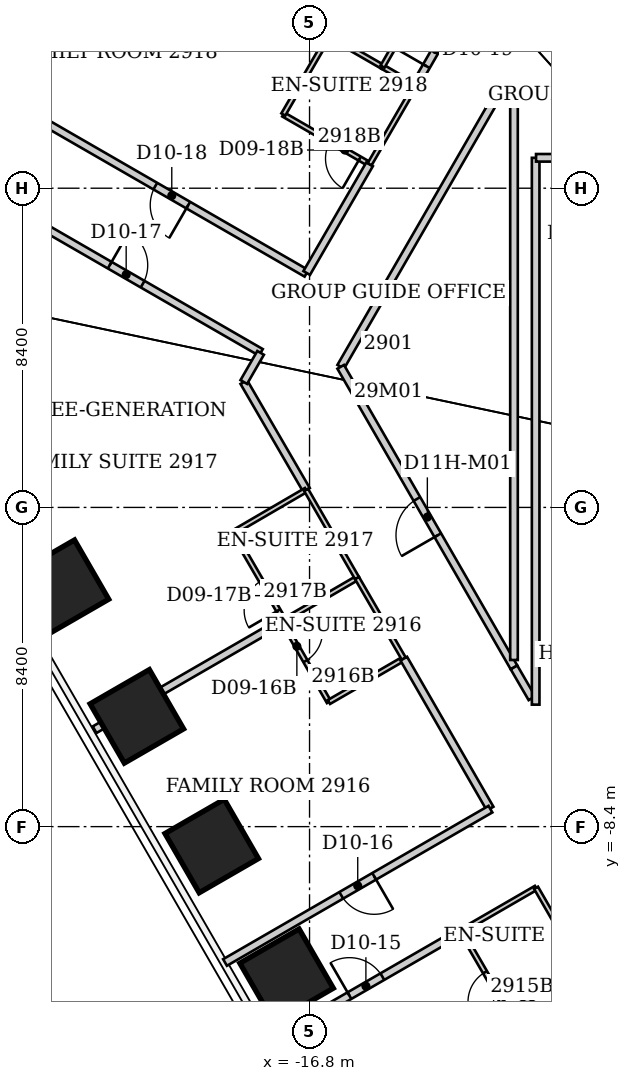
"""IFC4 building model, lengths in metres.
Left out: names, types, materials, properties, quantities, classifications, styles, units other than length and angle.
Written with IfcOpenShell. Run it as: python <this file> out.ifc"""

import sys

from ifc_helpers import new_model, si_unit, direction, frame, frame_2d, origin, origin_2d, place, context, subcontext, project, spatial, rectangle, extrude, element, fill, save


model = new_model("IFC4")
c1 = context("Model", 3, precision=1e-05, world=origin(), true_north=direction((0.0, 1.0)))
c2 = subcontext(c1, "Body", "Model", "MODEL_VIEW")
j1 = project(units=[si_unit("LENGTHUNIT", "METRE"), si_unit("PLANEANGLEUNIT", "RADIAN")], contexts=[c1])
p1 = place(None, origin())
s1 = spatial("IfcSite", under=j1, at=p1, CompositionType="ELEMENT")
p2 = place(p1, origin())
s2 = spatial("IfcBuilding", under=s1, at=p2, CompositionType="ELEMENT")
p3 = place(p2, frame((0.0, 0.0, 119.6)))
s3 = spatial("IfcBuildingStorey", under=s2, at=p3, CompositionType="ELEMENT", Elevation=119.6)
for number, where, z_axis, x_axis in (
    (1, (-17.404, -12.323, 0.0), (0.0, 0.0, 1.0), (-0.866, -0.5, 0.0)),
    (2, (-19.374, -8.911, 0.0), (0.0, 0.0, 1.0), (-0.866, -0.5, 0.0)),
    (3, (-21.344, -5.499, 0.0), (0.0, 0.0, 1.0), (-0.866, -0.5, 0.0)),
    (4, (-23.314, -2.087, 0.0), (0.0, 0.0, 1.0), (-0.866, -0.5, 0.0)),
):
    element("IfcColumn", number, at=place(p3, frame(where, z_axis=z_axis, x_axis=x_axis)), inside=s3, PredefinedType="COLUMN", context=c2, shape_type="SweptSolid", body=[
        extrude(rectangle(XDim=1.8, YDim=1.8, at=origin_2d()), origin(), (0.0, 0.0, 1.0), 3.8),
    ])
p4 = place(p3, frame((-25.17, 8.17, 0.0), z_axis=(0.0, 0.0, 1.0), x_axis=(0.866209421097, -0.499681137129, 0.0)))
e5 = element("IfcWall", 5, at=p4, inside=s3, PredefinedType="PARTITIONING", context=c2, shape_type="SweptSolid", body=[
    extrude(rectangle(XDim=8.185, YDim=0.2, at=frame_2d((4.092, 0.0))), origin(), (0.0, 0.0, 1.0), 3.64),
])
p5 = place(p4, frame((3.593, 0.0, 0.0)))
e6 = element("IfcOpeningElement", 6, at=p5, cuts=e5, PredefinedType="OPENING", context=c2, shape_type="SweptSolid", body=[
    extrude(rectangle(XDim=1.0, YDim=2.13, at=frame_2d((0.5, 1.065))), frame((0.0, 0.1, 0.0), z_axis=(0.0, -1.0, 0.0), x_axis=(1.0, 0.0, 0.0)), (0.0, 0.0, 1.0), 0.2),
])
p6 = place(p3, frame((-18.81, -0.66, 0.0), z_axis=(0.0, 0.0, 1.0), x_axis=(0.501789229896, -0.86498992408, 0.0)))
e7 = element("IfcWall", 7, at=p6, inside=s3, PredefinedType="PARTITIONING", context=c2, shape_type="SweptSolid", body=[
    extrude(rectangle(XDim=2.671, YDim=0.12, at=frame_2d((1.335, 0.0))), origin(), (0.0, 0.0, 1.0), 3.64),
])
p7 = place(p6, frame((1.47, 0.0, 0.0)))
e8 = element("IfcOpeningElement", 8, at=p7, cuts=e7, PredefinedType="OPENING", context=c2, shape_type="SweptSolid", body=[
    extrude(rectangle(XDim=0.9, YDim=2.03, at=frame_2d((0.45, 1.015))), frame((0.0, 0.06, 0.0), z_axis=(0.0, -1.0, 0.0), x_axis=(1.0, 0.0, 0.0)), (0.0, 0.0, 1.0), 0.12),
])
p8 = place(p3, frame((-18.53, 3.3, 0.0), z_axis=(0.0, 0.0, 1.0), x_axis=(0.502321995867, -0.864680641895, 0.0)))
e9 = element("IfcWall", 9, at=p8, inside=s3, PredefinedType="PARTITIONING", context=c2, shape_type="SweptSolid", body=[
    extrude(rectangle(XDim=3.285, YDim=0.2, at=frame_2d((1.642, 0.0))), origin(), (0.0, 0.0, 1.0), 3.64),
])
p9 = place(p3, frame((-18.087, 4.067, 0.0), z_axis=(0.0, 0.0, 1.0), x_axis=(-0.499905448813, -0.866079986056, 0.0)))
e10 = element("IfcWall", 10, at=p9, inside=s3, PredefinedType="PARTITIONING", context=c2, shape_type="SweptSolid", body=[
    extrude(rectangle(XDim=0.885, YDim=0.2, at=frame_2d((0.443, 0.0))), origin(), (0.0, 0.0, 1.0), 3.64),
])
p10 = place(p3, frame((-17.824, -14.045, 0.0), z_axis=(0.0, 0.0, 1.0), x_axis=(0.866007919525, 0.500030282404, 0.0)))
e11 = element("IfcWall", 11, at=p10, inside=s3, PredefinedType="PARTITIONING", context=c2, shape_type="SweptSolid", body=[
    extrude(rectangle(XDim=5.79, YDim=0.2, at=frame_2d((2.895, 0.0))), origin(), (0.0, 0.0, 1.0), 3.64),
])
p11 = place(p10, frame((2.395, 0.0, 0.0)))
e12 = element("IfcOpeningElement", 12, at=p11, cuts=e11, PredefinedType="OPENING", context=c2, shape_type="SweptSolid", body=[
    extrude(rectangle(XDim=1.0, YDim=2.13, at=frame_2d((0.5, 1.065))), frame((0.0, 0.1, 0.0), z_axis=(0.0, -1.0, 0.0), x_axis=(1.0, 0.0, 0.0)), (0.0, 0.0, 1.0), 0.2),
])
p12 = place(p3, frame((-17.51, -3.0, 0.0), z_axis=(0.0, 0.0, 1.0), x_axis=(0.864434275542, 0.502745843611, 0.0)))
e13 = element("IfcWall", 13, at=p12, inside=s3, PredefinedType="PARTITIONING", context=c2, shape_type="SweptSolid", body=[
    extrude(rectangle(XDim=2.267, YDim=0.12, at=frame_2d((1.134, 0.0))), origin(), (0.0, 0.0, 1.0), 3.64),
])
p13 = place(p3, frame((-17.508, -3.004, 0.0), z_axis=(0.0, 0.0, 1.0), x_axis=(0.498775507858, -0.866731211369, 0.0)))
e14 = element("IfcWall", 14, at=p13, inside=s3, PredefinedType="PARTITIONING", context=c2, shape_type="SweptSolid", body=[
    extrude(rectangle(XDim=2.441, YDim=0.12, at=frame_2d((1.22, 0.0))), origin(), (0.0, 0.0, 1.0), 3.64),
])
p14 = place(p13, frame((0.3, 0.0, 0.0)))
e15 = element("IfcOpeningElement", 15, at=p14, cuts=e14, PredefinedType="OPENING", context=c2, shape_type="SweptSolid", body=[
    extrude(rectangle(XDim=0.9, YDim=2.03, at=frame_2d((0.45, 1.015))), frame((0.0, 0.06, 0.0), z_axis=(0.0, -1.0, 0.0), x_axis=(1.0, 0.0, 0.0)), (0.0, 0.0, 1.0), 0.12),
])
p15 = place(p3, frame((-17.49, 10.34, 0.0), z_axis=(0.0, 0.0, 1.0), x_axis=(0.866114241029, -0.499846097802, 0.0)))
e16 = element("IfcWall", 16, at=p15, inside=s3, PredefinedType="PARTITIONING", context=c2, shape_type="SweptSolid", body=[
    extrude(rectangle(XDim=2.621, YDim=0.12, at=frame_2d((1.311, 0.0))), origin(), (0.0, 0.0, 1.0), 3.64),
])
p16 = place(p15, frame((1.421, 0.0, 0.0)))
e17 = element("IfcOpeningElement", 17, at=p16, cuts=e16, PredefinedType="OPENING", context=c2, shape_type="SweptSolid", body=[
    extrude(rectangle(XDim=0.9, YDim=2.03, at=frame_2d((0.45, 1.015))), frame((0.0, 0.06, 0.0), z_axis=(0.0, -1.0, 0.0), x_axis=(1.0, 0.0, 0.0)), (0.0, 0.0, 1.0), 0.12),
])
p17 = place(p3, frame((-17.47, -2.97, 0.0), z_axis=(0.0, 0.0, 1.0), x_axis=(-0.865919350456, -0.50018364478, 0.0)))
e18 = element("IfcWall", 18, at=p17, inside=s3, PredefinedType="PARTITIONING", context=c2, shape_type="SweptSolid", body=[
    extrude(rectangle(XDim=5.758, YDim=0.2, at=frame_2d((2.879, 0.0))), origin(), (0.0, 0.0, 1.0), 3.64),
])
p18 = place(p3, frame((-16.89, 0.46, 0.0), z_axis=(0.0, 0.0, 1.0), x_axis=(-0.863822716314, -0.503795905878, 0.0)))
e19 = element("IfcWall", 19, at=p18, inside=s3, PredefinedType="PARTITIONING", context=c2, shape_type="SweptSolid", body=[
    extrude(rectangle(XDim=2.223, YDim=0.12, at=frame_2d((1.111, 0.0))), origin(), (0.0, 0.0, 1.0), 3.64),
])
p19 = place(p3, frame((-16.88, 6.16, 0.0), z_axis=(0.0, 0.0, 1.0), x_axis=(-0.866203958324, 0.499690606859, 0.0)))
e20 = element("IfcWall", 20, at=p19, inside=s3, PredefinedType="PARTITIONING", context=c2, shape_type="SweptSolid", body=[
    extrude(rectangle(XDim=8.185, YDim=0.2, at=frame_2d((4.093, 0.0))), origin(), (0.0, 0.0, 1.0), 3.64),
])
p20 = place(p19, frame((3.593, 0.0, 0.0)))
e21 = element("IfcOpeningElement", 21, at=p20, cuts=e20, PredefinedType="OPENING", context=c2, shape_type="SweptSolid", body=[
    extrude(rectangle(XDim=1.0, YDim=2.13, at=frame_2d((0.5, 1.065))), frame((0.0, 0.1, 0.0), z_axis=(0.0, -1.0, 0.0), x_axis=(1.0, 0.0, 0.0)), (0.0, 0.0, 1.0), 0.2),
])
p21 = place(p3, frame((-16.875, 6.169, 0.0), z_axis=(0.0, 0.0, 1.0), x_axis=(0.500689767595, 0.865626799854, 0.0)))
e22 = element("IfcWall", 22, at=p21, inside=s3, PredefinedType="PARTITIONING", context=c2, shape_type="SweptSolid", body=[
    extrude(rectangle(XDim=3.305, YDim=0.2, at=frame_2d((1.653, 0.0))), origin(), (0.0, 0.0, 1.0), 3.64),
])
p22 = place(p3, frame((-16.29, -5.12, 0.0), z_axis=(0.0, 0.0, 1.0), x_axis=(0.865497265561, 0.500913648553, 0.0)))
e23 = element("IfcWall", 23, at=p22, inside=s3, PredefinedType="PARTITIONING", context=c2, shape_type="SweptSolid", body=[
    extrude(rectangle(XDim=2.276, YDim=0.12, at=frame_2d((1.138, 0.0))), origin(), (0.0, 0.0, 1.0), 3.64),
])
p23 = place(p3, frame((-16.29, 12.41, 0.0), z_axis=(0.0, 0.0, 1.0), x_axis=(-0.501547039172, -0.865130376012, 0.0)))
e24 = element("IfcWall", 24, at=p23, inside=s3, PredefinedType="PARTITIONING", context=c2, shape_type="SweptSolid", body=[
    extrude(rectangle(XDim=2.393, YDim=0.12, at=frame_2d((1.196, 0.0))), origin(), (0.0, 0.0, 1.0), 3.64),
])
p24 = place(p3, frame((-16.29, 12.41, 0.0), z_axis=(0.0, 0.0, 1.0), x_axis=(0.866138091645, -0.499804768086, 0.0)))
e25 = element("IfcWall", 25, at=p24, inside=s3, PredefinedType="PARTITIONING", context=c2, shape_type="SweptSolid", body=[
    extrude(rectangle(XDim=1.626, YDim=0.12, at=frame_2d((0.813, 0.0))), origin(), (0.0, 0.0, 1.0), 3.64),
])
p25 = place(p3, frame((-15.98, 3.7, 0.0), z_axis=(0.0, 0.0, 1.0), x_axis=(0.500093981358, 0.865971136822, 0.0)))
e26 = element("IfcWall", 26, at=p25, inside=s3, PredefinedType="PARTITIONING", context=c2, shape_type="SweptSolid", body=[
    extrude(rectangle(XDim=8.418, YDim=0.2, at=frame_2d((4.209, 0.0))), origin(), (0.0, 0.0, 1.0), 3.64),
])
p26 = place(p3, frame((-15.55, -1.86, 0.0), z_axis=(0.0, 0.0, 1.0), x_axis=(-0.500098439427, 0.865968562295, 0.0)))
e27 = element("IfcWall", 27, at=p26, inside=s3, PredefinedType="PARTITIONING", context=c2, shape_type="SweptSolid", body=[
    extrude(rectangle(XDim=2.679, YDim=0.12, at=frame_2d((1.34, 0.0))), origin(), (0.0, 0.0, 1.0), 3.64),
])
p27 = place(p3, frame((-15.55, -1.86, 0.0), z_axis=(0.0, 0.0, 1.0), x_axis=(0.501856726365, -0.86495076519, 0.0)))
e28 = element("IfcWall", 28, at=p27, inside=s3, PredefinedType="PARTITIONING", context=c2, shape_type="SweptSolid", body=[
    extrude(rectangle(XDim=2.451, YDim=0.12, at=frame_2d((1.226, 0.0))), origin(), (0.0, 0.0, 1.0), 3.64),
])
p28 = place(p3, frame((-15.22, 9.03, 0.0), z_axis=(0.0, 0.0, 1.0), x_axis=(0.501502765098, 0.865156041763, 0.0)))
e29 = element("IfcWall", 29, at=p28, inside=s3, PredefinedType="PARTITIONING", context=c2, shape_type="SweptSolid", body=[
    extrude(rectangle(XDim=2.393, YDim=0.12, at=frame_2d((1.196, 0.0))), origin(), (0.0, 0.0, 1.0), 3.64),
])
p29 = place(p3, frame((-14.882, 11.597, 0.0), z_axis=(0.0, 0.0, 1.0), x_axis=(0.866181499781, -0.499729536286, 0.0)))
e30 = element("IfcWall", 30, at=p29, inside=s3, PredefinedType="PARTITIONING", context=c2, shape_type="SweptSolid", body=[
    extrude(rectangle(XDim=0.995, YDim=0.12, at=frame_2d((0.497, 0.0))), origin(), (0.0, 0.0, 1.0), 3.64),
])
p30 = place(p3, frame((-14.88, 11.6, 0.0), z_axis=(0.0, 0.0, 1.0), x_axis=(0.497704656183, 0.867346571569, 0.0)))
e31 = element("IfcWall", 31, at=p30, inside=s3, PredefinedType="PARTITIONING", context=c2, shape_type="SweptSolid", body=[
    extrude(rectangle(XDim=2.652, YDim=0.12, at=frame_2d((1.326, 0.0))), origin(), (0.0, 0.0, 1.0), 3.64),
])
p31 = place(p3, frame((-14.32, -3.98, 0.0), z_axis=(0.0, 0.0, 1.0), x_axis=(0.49899372311, -0.866605599046, 0.0)))
e32 = element("IfcWall", 32, at=p31, inside=s3, PredefinedType="PARTITIONING", context=c2, shape_type="SweptSolid", body=[
    extrude(rectangle(XDim=4.555, YDim=0.2, at=frame_2d((2.277, 0.0))), origin(), (0.0, 0.0, 1.0), 3.64),
])
p32 = place(p3, frame((-14.02, 11.1, 0.0), z_axis=(0.0, 0.0, 1.0), x_axis=(0.499641723021, 0.866232156305, 0.0)))
e33 = element("IfcWall", 33, at=p32, inside=s3, PredefinedType="PARTITIONING", context=c2, shape_type="SweptSolid", body=[
    extrude(rectangle(XDim=2.182, YDim=0.2, at=frame_2d((1.091, 0.0))), origin(), (0.0, 0.0, 1.0), 3.64),
])
p33 = place(p32, frame((0.591, 0.0, 0.0)))
e34 = element("IfcOpeningElement", 34, at=p33, cuts=e33, PredefinedType="OPENING", context=c2, shape_type="SweptSolid", body=[
    extrude(rectangle(XDim=1.0, YDim=2.13, at=frame_2d((0.5, 1.065))), frame((0.0, 0.1, 0.0), z_axis=(0.0, -1.0, 0.0), x_axis=(1.0, 0.0, 0.0)), (0.0, 0.0, 1.0), 0.2),
])
p34 = place(p3, frame((-12.81, -11.15, 0.0), z_axis=(0.0, 0.0, 1.0), x_axis=(0.501813488763, -0.864975850817, 0.0)))
e35 = element("IfcWall", 35, at=p34, inside=s3, PredefinedType="PARTITIONING", context=c2, shape_type="SweptSolid", body=[
    extrude(rectangle(XDim=2.451, YDim=0.12, at=frame_2d((1.226, 0.0))), origin(), (0.0, 0.0, 1.0), 3.64),
])
p35 = place(p34, frame((1.251, 0.0, 0.0)))
e36 = element("IfcOpeningElement", 36, at=p35, cuts=e35, PredefinedType="OPENING", context=c2, shape_type="SweptSolid", body=[
    extrude(rectangle(XDim=0.9, YDim=2.03, at=frame_2d((0.45, 1.015))), frame((0.0, 0.06, 0.0), z_axis=(0.0, -1.0, 0.0), x_axis=(1.0, 0.0, 0.0)), (0.0, 0.0, 1.0), 0.12),
])
p36 = place(p3, frame((-12.81, -11.15, 0.0), z_axis=(0.0, 0.0, 1.0), x_axis=(0.865543766642, 0.500833293649, 0.0)))
e37 = element("IfcWall", 37, at=p36, inside=s3, PredefinedType="PARTITIONING", context=c2, shape_type="SweptSolid", body=[
    extrude(rectangle(XDim=2.276, YDim=0.12, at=frame_2d((1.138, 0.0))), origin(), (0.0, 0.0, 1.0), 3.64),
])
p37 = place(p3, frame((-12.04, -7.94, 0.0), z_axis=(0.0, 0.0, 1.0), x_axis=(-0.86587701925, -0.500256921525, 0.0)))
e38 = element("IfcWall", 38, at=p37, inside=s3, PredefinedType="PARTITIONING", context=c2, shape_type="SweptSolid", body=[
    extrude(rectangle(XDim=8.066, YDim=0.2, at=frame_2d((4.033, 0.0))), origin(), (0.0, 0.0, 1.0), 3.64),
])
p38 = place(p37, frame((3.533, 0.0, 0.0)))
e39 = element("IfcOpeningElement", 39, at=p38, cuts=e38, PredefinedType="OPENING", context=c2, shape_type="SweptSolid", body=[
    extrude(rectangle(XDim=1.0, YDim=2.13, at=frame_2d((0.5, 1.065))), frame((0.0, 0.1, 0.0), z_axis=(0.0, -1.0, 0.0), x_axis=(1.0, 0.0, 0.0)), (0.0, 0.0, 1.0), 0.2),
])
p39 = place(p3, frame((-11.77, 10.99, 0.0), z_axis=(0.0, 0.0, 1.0), x_axis=(1.0, 0.0, 0.0)))
e40 = element("IfcWall", 40, at=p39, inside=s3, PredefinedType="PARTITIONING", context=c2, shape_type="SweptSolid", body=[
    extrude(rectangle(XDim=0.35, YDim=0.2, at=frame_2d((0.175, 0.0))), origin(), (0.0, 0.0, 1.0), 3.64),
])
p40 = place(p3, frame((-11.58, -13.27, 0.0), z_axis=(0.0, 0.0, 1.0), x_axis=(0.867428373024, 0.497562074192, 0.0)))
e41 = element("IfcWall", 41, at=p40, inside=s3, PredefinedType="PARTITIONING", context=c2, shape_type="SweptSolid", body=[
    extrude(rectangle(XDim=2.271, YDim=0.12, at=frame_2d((1.136, 0.0))), origin(), (0.0, 0.0, 1.0), 3.64),
])
p41 = place(p3, frame((-11.42, -4.21, 0.0), z_axis=(0.0, 0.0, 1.0), x_axis=(-0.499446957289, 0.866344467781, 0.0)))
e42 = element("IfcWall", 42, at=p41, inside=s3, PredefinedType="PARTITIONING", context=c2, shape_type="SweptSolid", body=[
    extrude(rectangle(XDim=9.13, YDim=0.2, at=frame_2d((4.565, 0.0))), origin(), (0.0, 0.0, 1.0), 3.64),
])
p42 = place(p41, frame((4.015, 0.0, 0.0)))
e43 = element("IfcOpeningElement", 43, at=p42, cuts=e42, PredefinedType="OPENING", context=c2, shape_type="SweptSolid", body=[
    extrude(rectangle(XDim=1.1, YDim=2.2, at=frame_2d((0.55, 1.1))), frame((0.0, 0.1, 0.0), z_axis=(0.0, -1.0, 0.0), x_axis=(1.0, 0.0, 0.0)), (0.0, 0.0, 1.0), 0.2),
])
p43 = place(p3, frame((-11.42, 10.98, 0.0), z_axis=(0.0, 0.0, 1.0), x_axis=(0.0, -1.0, 0.0)))
e44 = element("IfcWall", 44, at=p43, inside=s3, PredefinedType="PARTITIONING", context=c2, shape_type="SweptSolid", body=[
    extrude(rectangle(XDim=14.995, YDim=0.2, at=frame_2d((7.498, 0.0))), origin(), (0.0, 0.0, 1.0), 3.64),
])
p44 = place(p3, frame((-11.42, 10.99, 0.0), z_axis=(0.0, 0.0, 1.0), x_axis=(1.0, 0.0, 0.0)))
e45 = element("IfcWall", 45, at=p44, inside=s3, PredefinedType="PARTITIONING", context=c2, shape_type="SweptSolid", body=[
    extrude(rectangle(XDim=4.57, YDim=0.2, at=frame_2d((2.285, 0.0))), origin(), (0.0, 0.0, 1.0), 3.64),
])
p45 = place(p44, frame((1.735, 0.0, 0.0)))
e46 = element("IfcOpeningElement", 46, at=p45, cuts=e45, PredefinedType="OPENING", context=c2, shape_type="SweptSolid", body=[
    extrude(rectangle(XDim=1.1, YDim=2.2, at=frame_2d((0.55, 1.1))), frame((0.0, 0.1, 0.0), z_axis=(0.0, -1.0, 0.0), x_axis=(1.0, 0.0, 0.0)), (0.0, 0.0, 1.0), 0.2),
])
p46 = place(p3, frame((-10.948, -5.021, 0.0), z_axis=(0.0, 0.0, 1.0), x_axis=(-0.502706337432, 0.86445725071, 0.0)))
e47 = element("IfcWall", 47, at=p46, inside=s3, PredefinedType="PARTITIONING", context=c2, shape_type="SweptSolid", body=[
    extrude(rectangle(XDim=0.939, YDim=0.2, at=frame_2d((0.469, 0.0))), origin(), (0.0, 0.0, 1.0), 3.64),
])
p47 = place(p3, frame((-10.85, 9.2, 0.0), z_axis=(0.0, 0.0, 1.0), x_axis=(0.0, -1.0, 0.0)))
e48 = element("IfcWall", 48, at=p47, inside=s3, PredefinedType="PARTITIONING", context=c2, shape_type="SweptSolid", body=[
    extrude(rectangle(XDim=14.39, YDim=0.2, at=frame_2d((7.195, 0.0))), origin(), (0.0, 0.0, 1.0), 3.64),
])
p48 = place(p3, frame((-10.84, -10.01, 0.0), z_axis=(0.0, 0.0, 1.0), x_axis=(0.500089055364, -0.86597398154, 0.0)))
e49 = element("IfcWall", 49, at=p48, inside=s3, PredefinedType="PARTITIONING", context=c2, shape_type="SweptSolid", body=[
    extrude(rectangle(XDim=2.459, YDim=0.12, at=frame_2d((1.23, 0.0))), origin(), (0.0, 0.0, 1.0), 3.64),
])
p49 = place(p3, frame((-6.85, 9.2, 0.0), z_axis=(0.0, 0.0, 1.0), x_axis=(-1.0, 0.0, 0.0)))
e50 = element("IfcWall", 50, at=p49, inside=s3, PredefinedType="PARTITIONING", context=c2, shape_type="SweptSolid", body=[
    extrude(rectangle(XDim=3.99, YDim=0.2, at=frame_2d((1.995, 0.0))), origin(), (0.0, 0.0, 1.0), 3.64),
])
p50 = place(p11, origin())
e51 = element("IfcDoor", 51, at=p50, inside=s3, OperationType="SINGLE_SWING_LEFT", PredefinedType="DOOR", context=c2, shape_type="SweptSolid", body=[
    extrude(rectangle(XDim=1.0, YDim=2.13, at=frame_2d((0.5, 1.065))), frame((0.0, 0.025, 0.0), z_axis=(0.0, -1.0, 0.0), x_axis=(1.0, 0.0, 0.0)), (0.0, 0.0, 1.0), 0.05),
])
fill(e12, e51)
p51 = place(p35, origin())
e52 = element("IfcDoor", 52, at=p51, inside=s3, OperationType="SINGLE_SWING_RIGHT", PredefinedType="DOOR", context=c2, shape_type="SweptSolid", body=[
    extrude(rectangle(XDim=0.9, YDim=2.03, at=frame_2d((0.45, 1.015))), frame((0.0, 0.025, 0.0), z_axis=(0.0, -1.0, 0.0), x_axis=(1.0, 0.0, 0.0)), (0.0, 0.0, 1.0), 0.05),
])
fill(e36, e52)
p52 = place(p38, origin())
e53 = element("IfcDoor", 53, at=p52, inside=s3, OperationType="SINGLE_SWING_LEFT", PredefinedType="DOOR", context=c2, shape_type="SweptSolid", body=[
    extrude(rectangle(XDim=1.0, YDim=2.13, at=frame_2d((0.5, 1.065))), frame((0.0, 0.025, 0.0), z_axis=(0.0, -1.0, 0.0), x_axis=(1.0, 0.0, 0.0)), (0.0, 0.0, 1.0), 0.05),
])
fill(e39, e53)
p53 = place(p14, origin())
e54 = element("IfcDoor", 54, at=p53, inside=s3, OperationType="SINGLE_SWING_LEFT", PredefinedType="DOOR", context=c2, shape_type="SweptSolid", body=[
    extrude(rectangle(XDim=0.9, YDim=2.03, at=frame_2d((0.45, 1.015))), frame((0.0, 0.025, 0.0), z_axis=(0.0, -1.0, 0.0), x_axis=(1.0, 0.0, 0.0)), (0.0, 0.0, 1.0), 0.05),
])
fill(e15, e54)
p54 = place(p5, origin())
e55 = element("IfcDoor", 55, at=p54, inside=s3, OperationType="SINGLE_SWING_LEFT", PredefinedType="DOOR", context=c2, shape_type="SweptSolid", body=[
    extrude(rectangle(XDim=1.0, YDim=2.13, at=frame_2d((0.5, 1.065))), frame((0.0, 0.025, 0.0), z_axis=(0.0, -1.0, 0.0), x_axis=(1.0, 0.0, 0.0)), (0.0, 0.0, 1.0), 0.05),
])
fill(e6, e55)
p55 = place(p7, origin())
e56 = element("IfcDoor", 56, at=p55, inside=s3, OperationType="SINGLE_SWING_RIGHT", PredefinedType="DOOR", context=c2, shape_type="SweptSolid", body=[
    extrude(rectangle(XDim=0.9, YDim=2.03, at=frame_2d((0.45, 1.015))), frame((0.0, 0.025, 0.0), z_axis=(0.0, -1.0, 0.0), x_axis=(1.0, 0.0, 0.0)), (0.0, 0.0, 1.0), 0.05),
])
fill(e8, e56)
p56 = place(p20, origin())
e57 = element("IfcDoor", 57, at=p56, inside=s3, OperationType="SINGLE_SWING_LEFT", PredefinedType="DOOR", context=c2, shape_type="SweptSolid", body=[
    extrude(rectangle(XDim=1.0, YDim=2.13, at=frame_2d((0.5, 1.065))), frame((0.0, 0.025, 0.0), z_axis=(0.0, -1.0, 0.0), x_axis=(1.0, 0.0, 0.0)), (0.0, 0.0, 1.0), 0.05),
])
fill(e21, e57)
p57 = place(p16, origin())
e58 = element("IfcDoor", 58, at=p57, inside=s3, OperationType="SINGLE_SWING_RIGHT", PredefinedType="DOOR", context=c2, shape_type="SweptSolid", body=[
    extrude(rectangle(XDim=0.9, YDim=2.03, at=frame_2d((0.45, 1.015))), frame((0.0, 0.025, 0.0), z_axis=(0.0, -1.0, 0.0), x_axis=(1.0, 0.0, 0.0)), (0.0, 0.0, 1.0), 0.05),
])
fill(e17, e58)
p58 = place(p33, origin())
e59 = element("IfcDoor", 59, at=p58, inside=s3, OperationType="SINGLE_SWING_LEFT", PredefinedType="DOOR", context=c2, shape_type="SweptSolid", body=[
    extrude(rectangle(XDim=1.0, YDim=2.13, at=frame_2d((0.5, 1.065))), frame((0.0, 0.025, 0.0), z_axis=(0.0, -1.0, 0.0), x_axis=(1.0, 0.0, 0.0)), (0.0, 0.0, 1.0), 0.05),
])
fill(e34, e59)
p59 = place(p42, origin())
e60 = element("IfcDoor", 60, at=p59, inside=s3, OperationType="SINGLE_SWING_LEFT", PredefinedType="DOOR", context=c2, shape_type="SweptSolid", body=[
    extrude(rectangle(XDim=1.1, YDim=2.2, at=frame_2d((0.55, 1.1))), frame((0.0, 0.025, 0.0), z_axis=(0.0, -1.0, 0.0), x_axis=(1.0, 0.0, 0.0)), (0.0, 0.0, 1.0), 0.05),
])
fill(e43, e60)
save(model, sys.argv[1])
